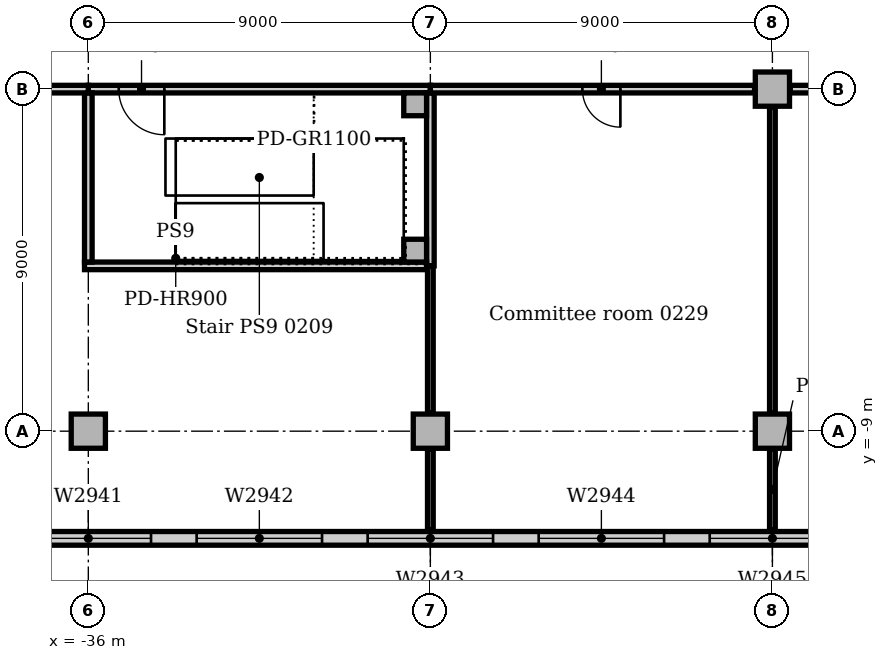
"""IFC4 building model, lengths in metres.
Left out: names, types, materials, properties, quantities, classifications, styles, units other than length and angle.
Written with IfcOpenShell. Run it as: python <this file> out.ifc"""

import sys

from ifc_helpers import new_model, si_unit, direction, frame, frame_2d, origin, origin_2d, place, context, subcontext, project, spatial, rectangle, extrude, element, fill, save


model = new_model("IFC4")
c1 = context("Model", 3, precision=1e-05, world=origin(), true_north=direction((0.0, 1.0)))
c2 = subcontext(c1, "Body", "Model", "MODEL_VIEW")
j1 = project(units=[si_unit("LENGTHUNIT", "METRE"), si_unit("PLANEANGLEUNIT", "RADIAN")], contexts=[c1])
p1 = place(None, origin())
s1 = spatial("IfcSite", under=j1, at=p1, CompositionType="ELEMENT")
p2 = place(p1, origin())
s2 = spatial("IfcBuilding", under=s1, at=p2, CompositionType="ELEMENT")
p3 = place(p2, frame((0.0, 0.0, 11.0)))
s3 = spatial("IfcBuildingStorey", under=s2, at=p3, CompositionType="ELEMENT", Elevation=11.0)
for number, where, z_axis, x_axis in (
    (1, (-36.0, -9.0, 0.0), (0.0, 0.0, 1.0), (1.0, 0.0, 0.0)),
    (2, (-27.0, -9.0, 0.0), (0.0, 0.0, 1.0), (1.0, 0.0, 0.0)),
    (3, (-18.0, -9.0, 0.0), (0.0, 0.0, 1.0), (1.0, 0.0, 0.0)),
    (4, (-18.0, 0.0, 0.0), (0.0, 0.0, 1.0), (1.0, 0.0, 0.0)),
):
    element("IfcColumn", number, at=place(p3, frame(where, z_axis=z_axis, x_axis=x_axis)), inside=s3, PredefinedType="COLUMN", context=c2, shape_type="SweptSolid", body=[
        extrude(rectangle(XDim=0.9, YDim=0.9, at=origin_2d()), origin(), (0.0, 0.0, 1.0), 4.7),
    ])
p4 = place(p3, frame((-81.0, -11.82, 0.0), z_axis=(0.0, 0.0, 1.0), x_axis=(1.0, 0.0, 0.0)))
e5 = element("IfcWall", 5, at=p4, inside=s3, PredefinedType="STANDARD", context=c2, shape_type="SweptSolid", body=[
    extrude(rectangle(XDim=144.0, YDim=0.36, at=frame_2d((72.0, 0.0))), origin(), (0.0, 0.0, 1.0), 4.7),
])
p5 = place(p4, frame((2.85, 0.0, 0.9)))
e6 = element("IfcOpeningElement", 6, at=p5, cuts=e5, PredefinedType="OPENING", context=c2, shape_type="SweptSolid", body=[
    extrude(rectangle(XDim=3.3, YDim=2.4, at=frame_2d((1.65, 1.2))), frame((0.0, 0.19, 0.0), z_axis=(0.0, -1.0, 0.0), x_axis=(1.0, 0.0, 0.0)), (0.0, 0.0, 1.0), 0.38),
])
p6 = place(p4, frame((7.35, 0.0, 0.9)))
e7 = element("IfcOpeningElement", 7, at=p6, cuts=e5, PredefinedType="OPENING", context=c2, shape_type="SweptSolid", body=[
    extrude(rectangle(XDim=3.3, YDim=2.4, at=frame_2d((1.65, 1.2))), frame((0.0, 0.19, 0.0), z_axis=(0.0, -1.0, 0.0), x_axis=(1.0, 0.0, 0.0)), (0.0, 0.0, 1.0), 0.38),
])
p7 = place(p4, frame((11.85, 0.0, 0.9)))
e8 = element("IfcOpeningElement", 8, at=p7, cuts=e5, PredefinedType="OPENING", context=c2, shape_type="SweptSolid", body=[
    extrude(rectangle(XDim=3.3, YDim=2.4, at=frame_2d((1.65, 1.2))), frame((0.0, 0.19, 0.0), z_axis=(0.0, -1.0, 0.0), x_axis=(1.0, 0.0, 0.0)), (0.0, 0.0, 1.0), 0.38),
])
p8 = place(p4, frame((16.35, 0.0, 0.9)))
e9 = element("IfcOpeningElement", 9, at=p8, cuts=e5, PredefinedType="OPENING", context=c2, shape_type="SweptSolid", body=[
    extrude(rectangle(XDim=3.3, YDim=2.4, at=frame_2d((1.65, 1.2))), frame((0.0, 0.19, 0.0), z_axis=(0.0, -1.0, 0.0), x_axis=(1.0, 0.0, 0.0)), (0.0, 0.0, 1.0), 0.38),
])
p9 = place(p4, frame((20.85, 0.0, 0.9)))
e10 = element("IfcOpeningElement", 10, at=p9, cuts=e5, PredefinedType="OPENING", context=c2, shape_type="SweptSolid", body=[
    extrude(rectangle(XDim=3.3, YDim=2.4, at=frame_2d((1.65, 1.2))), frame((0.0, 0.19, 0.0), z_axis=(0.0, -1.0, 0.0), x_axis=(1.0, 0.0, 0.0)), (0.0, 0.0, 1.0), 0.38),
])
p10 = place(p4, frame((25.35, 0.0, 0.9)))
e11 = element("IfcOpeningElement", 11, at=p10, cuts=e5, PredefinedType="OPENING", context=c2, shape_type="SweptSolid", body=[
    extrude(rectangle(XDim=3.3, YDim=2.4, at=frame_2d((1.65, 1.2))), frame((0.0, 0.19, 0.0), z_axis=(0.0, -1.0, 0.0), x_axis=(1.0, 0.0, 0.0)), (0.0, 0.0, 1.0), 0.38),
])
p11 = place(p4, frame((29.85, 0.0, 0.9)))
e12 = element("IfcOpeningElement", 12, at=p11, cuts=e5, PredefinedType="OPENING", context=c2, shape_type="SweptSolid", body=[
    extrude(rectangle(XDim=3.3, YDim=2.4, at=frame_2d((1.65, 1.2))), frame((0.0, 0.19, 0.0), z_axis=(0.0, -1.0, 0.0), x_axis=(1.0, 0.0, 0.0)), (0.0, 0.0, 1.0), 0.38),
])
p12 = place(p4, frame((34.35, 0.0, 0.9)))
e13 = element("IfcOpeningElement", 13, at=p12, cuts=e5, PredefinedType="OPENING", context=c2, shape_type="SweptSolid", body=[
    extrude(rectangle(XDim=3.3, YDim=2.4, at=frame_2d((1.65, 1.2))), frame((0.0, 0.19, 0.0), z_axis=(0.0, -1.0, 0.0), x_axis=(1.0, 0.0, 0.0)), (0.0, 0.0, 1.0), 0.38),
])
p13 = place(p4, frame((38.85, 0.0, 0.9)))
e14 = element("IfcOpeningElement", 14, at=p13, cuts=e5, PredefinedType="OPENING", context=c2, shape_type="SweptSolid", body=[
    extrude(rectangle(XDim=3.3, YDim=2.4, at=frame_2d((1.65, 1.2))), frame((0.0, 0.19, 0.0), z_axis=(0.0, -1.0, 0.0), x_axis=(1.0, 0.0, 0.0)), (0.0, 0.0, 1.0), 0.38),
])
p14 = place(p4, frame((43.35, 0.0, 0.9)))
e15 = element("IfcOpeningElement", 15, at=p14, cuts=e5, PredefinedType="OPENING", context=c2, shape_type="SweptSolid", body=[
    extrude(rectangle(XDim=3.3, YDim=2.4, at=frame_2d((1.65, 1.2))), frame((0.0, 0.19, 0.0), z_axis=(0.0, -1.0, 0.0), x_axis=(1.0, 0.0, 0.0)), (0.0, 0.0, 1.0), 0.38),
])
p15 = place(p4, frame((47.85, 0.0, 0.9)))
e16 = element("IfcOpeningElement", 16, at=p15, cuts=e5, PredefinedType="OPENING", context=c2, shape_type="SweptSolid", body=[
    extrude(rectangle(XDim=3.3, YDim=2.4, at=frame_2d((1.65, 1.2))), frame((0.0, 0.19, 0.0), z_axis=(0.0, -1.0, 0.0), x_axis=(1.0, 0.0, 0.0)), (0.0, 0.0, 1.0), 0.38),
])
p16 = place(p4, frame((52.35, 0.0, 0.9)))
e17 = element("IfcOpeningElement", 17, at=p16, cuts=e5, PredefinedType="OPENING", context=c2, shape_type="SweptSolid", body=[
    extrude(rectangle(XDim=3.3, YDim=2.4, at=frame_2d((1.65, 1.2))), frame((0.0, 0.19, 0.0), z_axis=(0.0, -1.0, 0.0), x_axis=(1.0, 0.0, 0.0)), (0.0, 0.0, 1.0), 0.38),
])
p17 = place(p4, frame((56.85, 0.0, 0.9)))
e18 = element("IfcOpeningElement", 18, at=p17, cuts=e5, PredefinedType="OPENING", context=c2, shape_type="SweptSolid", body=[
    extrude(rectangle(XDim=3.3, YDim=2.4, at=frame_2d((1.65, 1.2))), frame((0.0, 0.19, 0.0), z_axis=(0.0, -1.0, 0.0), x_axis=(1.0, 0.0, 0.0)), (0.0, 0.0, 1.0), 0.38),
])
p18 = place(p4, frame((61.35, 0.0, 0.9)))
e19 = element("IfcOpeningElement", 19, at=p18, cuts=e5, PredefinedType="OPENING", context=c2, shape_type="SweptSolid", body=[
    extrude(rectangle(XDim=3.3, YDim=2.4, at=frame_2d((1.65, 1.2))), frame((0.0, 0.19, 0.0), z_axis=(0.0, -1.0, 0.0), x_axis=(1.0, 0.0, 0.0)), (0.0, 0.0, 1.0), 0.38),
])
p19 = place(p4, frame((65.85, 0.0, 0.9)))
e20 = element("IfcOpeningElement", 20, at=p19, cuts=e5, PredefinedType="OPENING", context=c2, shape_type="SweptSolid", body=[
    extrude(rectangle(XDim=3.3, YDim=2.4, at=frame_2d((1.65, 1.2))), frame((0.0, 0.19, 0.0), z_axis=(0.0, -1.0, 0.0), x_axis=(1.0, 0.0, 0.0)), (0.0, 0.0, 1.0), 0.38),
])
p20 = place(p4, frame((70.35, 0.0, 0.9)))
e21 = element("IfcOpeningElement", 21, at=p20, cuts=e5, PredefinedType="OPENING", context=c2, shape_type="SweptSolid", body=[
    extrude(rectangle(XDim=3.3, YDim=2.4, at=frame_2d((1.65, 1.2))), frame((0.0, 0.19, 0.0), z_axis=(0.0, -1.0, 0.0), x_axis=(1.0, 0.0, 0.0)), (0.0, 0.0, 1.0), 0.38),
])
p21 = place(p4, frame((74.85, 0.0, 0.9)))
e22 = element("IfcOpeningElement", 22, at=p21, cuts=e5, PredefinedType="OPENING", context=c2, shape_type="SweptSolid", body=[
    extrude(rectangle(XDim=3.3, YDim=2.4, at=frame_2d((1.65, 1.2))), frame((0.0, 0.19, 0.0), z_axis=(0.0, -1.0, 0.0), x_axis=(1.0, 0.0, 0.0)), (0.0, 0.0, 1.0), 0.38),
])
p22 = place(p4, frame((79.35, 0.0, 0.9)))
e23 = element("IfcOpeningElement", 23, at=p22, cuts=e5, PredefinedType="OPENING", context=c2, shape_type="SweptSolid", body=[
    extrude(rectangle(XDim=3.3, YDim=2.4, at=frame_2d((1.65, 1.2))), frame((0.0, 0.19, 0.0), z_axis=(0.0, -1.0, 0.0), x_axis=(1.0, 0.0, 0.0)), (0.0, 0.0, 1.0), 0.38),
])
p23 = place(p4, frame((83.85, 0.0, 0.9)))
e24 = element("IfcOpeningElement", 24, at=p23, cuts=e5, PredefinedType="OPENING", context=c2, shape_type="SweptSolid", body=[
    extrude(rectangle(XDim=3.3, YDim=2.4, at=frame_2d((1.65, 1.2))), frame((0.0, 0.19, 0.0), z_axis=(0.0, -1.0, 0.0), x_axis=(1.0, 0.0, 0.0)), (0.0, 0.0, 1.0), 0.38),
])
p24 = place(p4, frame((88.35, 0.0, 0.9)))
e25 = element("IfcOpeningElement", 25, at=p24, cuts=e5, PredefinedType="OPENING", context=c2, shape_type="SweptSolid", body=[
    extrude(rectangle(XDim=3.3, YDim=2.4, at=frame_2d((1.65, 1.2))), frame((0.0, 0.19, 0.0), z_axis=(0.0, -1.0, 0.0), x_axis=(1.0, 0.0, 0.0)), (0.0, 0.0, 1.0), 0.38),
])
p25 = place(p4, frame((92.85, 0.0, 0.9)))
e26 = element("IfcOpeningElement", 26, at=p25, cuts=e5, PredefinedType="OPENING", context=c2, shape_type="SweptSolid", body=[
    extrude(rectangle(XDim=3.3, YDim=2.4, at=frame_2d((1.65, 1.2))), frame((0.0, 0.19, 0.0), z_axis=(0.0, -1.0, 0.0), x_axis=(1.0, 0.0, 0.0)), (0.0, 0.0, 1.0), 0.38),
])
p26 = place(p4, frame((97.35, 0.0, 0.9)))
e27 = element("IfcOpeningElement", 27, at=p26, cuts=e5, PredefinedType="OPENING", context=c2, shape_type="SweptSolid", body=[
    extrude(rectangle(XDim=3.3, YDim=2.4, at=frame_2d((1.65, 1.2))), frame((0.0, 0.19, 0.0), z_axis=(0.0, -1.0, 0.0), x_axis=(1.0, 0.0, 0.0)), (0.0, 0.0, 1.0), 0.38),
])
p27 = place(p4, frame((101.85, 0.0, 0.9)))
e28 = element("IfcOpeningElement", 28, at=p27, cuts=e5, PredefinedType="OPENING", context=c2, shape_type="SweptSolid", body=[
    extrude(rectangle(XDim=3.3, YDim=2.4, at=frame_2d((1.65, 1.2))), frame((0.0, 0.19, 0.0), z_axis=(0.0, -1.0, 0.0), x_axis=(1.0, 0.0, 0.0)), (0.0, 0.0, 1.0), 0.38),
])
p28 = place(p4, frame((106.35, 0.0, 0.9)))
e29 = element("IfcOpeningElement", 29, at=p28, cuts=e5, PredefinedType="OPENING", context=c2, shape_type="SweptSolid", body=[
    extrude(rectangle(XDim=3.3, YDim=2.4, at=frame_2d((1.65, 1.2))), frame((0.0, 0.19, 0.0), z_axis=(0.0, -1.0, 0.0), x_axis=(1.0, 0.0, 0.0)), (0.0, 0.0, 1.0), 0.38),
])
p29 = place(p4, frame((110.85, 0.0, 0.9)))
e30 = element("IfcOpeningElement", 30, at=p29, cuts=e5, PredefinedType="OPENING", context=c2, shape_type="SweptSolid", body=[
    extrude(rectangle(XDim=3.3, YDim=2.4, at=frame_2d((1.65, 1.2))), frame((0.0, 0.19, 0.0), z_axis=(0.0, -1.0, 0.0), x_axis=(1.0, 0.0, 0.0)), (0.0, 0.0, 1.0), 0.38),
])
p30 = place(p4, frame((115.35, 0.0, 0.9)))
e31 = element("IfcOpeningElement", 31, at=p30, cuts=e5, PredefinedType="OPENING", context=c2, shape_type="SweptSolid", body=[
    extrude(rectangle(XDim=3.3, YDim=2.4, at=frame_2d((1.65, 1.2))), frame((0.0, 0.19, 0.0), z_axis=(0.0, -1.0, 0.0), x_axis=(1.0, 0.0, 0.0)), (0.0, 0.0, 1.0), 0.38),
])
p31 = place(p4, frame((119.85, 0.0, 0.9)))
e32 = element("IfcOpeningElement", 32, at=p31, cuts=e5, PredefinedType="OPENING", context=c2, shape_type="SweptSolid", body=[
    extrude(rectangle(XDim=3.3, YDim=2.4, at=frame_2d((1.65, 1.2))), frame((0.0, 0.19, 0.0), z_axis=(0.0, -1.0, 0.0), x_axis=(1.0, 0.0, 0.0)), (0.0, 0.0, 1.0), 0.38),
])
p32 = place(p4, frame((124.35, 0.0, 0.9)))
e33 = element("IfcOpeningElement", 33, at=p32, cuts=e5, PredefinedType="OPENING", context=c2, shape_type="SweptSolid", body=[
    extrude(rectangle(XDim=3.3, YDim=2.4, at=frame_2d((1.65, 1.2))), frame((0.0, 0.19, 0.0), z_axis=(0.0, -1.0, 0.0), x_axis=(1.0, 0.0, 0.0)), (0.0, 0.0, 1.0), 0.38),
])
p33 = place(p4, frame((128.85, 0.0, 0.9)))
e34 = element("IfcOpeningElement", 34, at=p33, cuts=e5, PredefinedType="OPENING", context=c2, shape_type="SweptSolid", body=[
    extrude(rectangle(XDim=3.3, YDim=2.4, at=frame_2d((1.65, 1.2))), frame((0.0, 0.19, 0.0), z_axis=(0.0, -1.0, 0.0), x_axis=(1.0, 0.0, 0.0)), (0.0, 0.0, 1.0), 0.38),
])
p34 = place(p4, frame((133.35, 0.0, 0.9)))
e35 = element("IfcOpeningElement", 35, at=p34, cuts=e5, PredefinedType="OPENING", context=c2, shape_type="SweptSolid", body=[
    extrude(rectangle(XDim=3.3, YDim=2.4, at=frame_2d((1.65, 1.2))), frame((0.0, 0.19, 0.0), z_axis=(0.0, -1.0, 0.0), x_axis=(1.0, 0.0, 0.0)), (0.0, 0.0, 1.0), 0.38),
])
p35 = place(p4, frame((137.85, 0.0, 0.9)))
e36 = element("IfcOpeningElement", 36, at=p35, cuts=e5, PredefinedType="OPENING", context=c2, shape_type="SweptSolid", body=[
    extrude(rectangle(XDim=3.3, YDim=2.4, at=frame_2d((1.65, 1.2))), frame((0.0, 0.19, 0.0), z_axis=(0.0, -1.0, 0.0), x_axis=(1.0, 0.0, 0.0)), (0.0, 0.0, 1.0), 0.38),
])
for number, where, z_axis, x_axis in (
    (37, (-27.4, -4.25, 0.0), (0.0, 0.0, 1.0), (1.0, 0.0, 0.0)),
    (38, (-27.4, -0.4, 0.0), (0.0, 0.0, 1.0), (1.0, 0.0, 0.0)),
):
    element("IfcColumn", number, at=place(p3, frame(where, z_axis=z_axis, x_axis=x_axis)), inside=s3, PredefinedType="COLUMN", context=c2, shape_type="SweptSolid", body=[
        extrude(rectangle(XDim=0.6, YDim=0.6, at=origin_2d()), origin(), (0.0, 0.0, 1.0), 5.0),
    ])
p36 = place(p3, frame((-36.0, 0.0, 0.0), z_axis=(0.0, 0.0, 1.0), x_axis=(1.0, 0.0, 0.0)))
e39 = element("IfcWall", 39, at=p36, inside=s3, PredefinedType="SOLIDWALL", context=c2, shape_type="SweptSolid", body=[
    extrude(rectangle(XDim=9.0, YDim=0.2, at=frame_2d((4.5, 0.0))), origin(), (0.0, 0.0, 1.0), 4.7),
])
p37 = place(p36, frame((0.8, 0.0, 0.0)))
e40 = element("IfcOpeningElement", 40, at=p37, cuts=e39, PredefinedType="OPENING", context=c2, shape_type="SweptSolid", body=[
    extrude(rectangle(XDim=1.2, YDim=2.1, at=frame_2d((0.6, 1.05))), frame((0.0, 0.11, 0.0), z_axis=(0.0, -1.0, 0.0), x_axis=(1.0, 0.0, 0.0)), (0.0, 0.0, 1.0), 0.22),
])
p38 = place(p3, frame((-27.0, -4.65, 0.0), z_axis=(0.0, 0.0, 1.0), x_axis=(0.0, 1.0, 0.0)))
e41 = element("IfcWall", 41, at=p38, inside=s3, PredefinedType="SOLIDWALL", context=c2, shape_type="SweptSolid", body=[
    extrude(rectangle(XDim=4.55, YDim=0.2, at=frame_2d((2.275, 0.0))), origin(), (0.0, 0.0, 1.0), 4.7),
])
p39 = place(p3, frame((-36.1, -4.65, 0.0), z_axis=(0.0, 0.0, 1.0), x_axis=(1.0, 0.0, 0.0)))
e42 = element("IfcWall", 42, at=p39, inside=s3, PredefinedType="SOLIDWALL", context=c2, shape_type="SweptSolid", body=[
    extrude(rectangle(XDim=9.0, YDim=0.2, at=frame_2d((4.5, 0.0))), origin(), (0.0, 0.0, 1.0), 4.7),
])
p40 = place(p3, frame((-36.0, -4.55, 0.0), z_axis=(0.0, 0.0, 1.0), x_axis=(0.0, 1.0, 0.0)))
e43 = element("IfcWall", 43, at=p40, inside=s3, PredefinedType="SOLIDWALL", context=c2, shape_type="SweptSolid", body=[
    extrude(rectangle(XDim=4.45, YDim=0.2, at=frame_2d((2.225, 0.0))), origin(), (0.0, 0.0, 1.0), 4.7),
])
p41 = place(p3, frame((-45.0, 0.0, 0.0), z_axis=(0.0, 0.0, 1.0), x_axis=(1.0, 0.0, 0.0)))
e44 = element("IfcWall", 44, at=p41, inside=s3, PredefinedType="PARTITIONING", context=c2, shape_type="SweptSolid", body=[
    extrude(rectangle(XDim=9.0, YDim=0.2, at=frame_2d((4.5, 0.0))), origin(), (0.0, 0.0, 1.0), 4.7),
])
p42 = place(p41, frame((4.0, 0.0, 0.0)))
e45 = element("IfcOpeningElement", 45, at=p42, cuts=e44, PredefinedType="OPENING", context=c2, shape_type="SweptSolid", body=[
    extrude(rectangle(XDim=1.0, YDim=2.1, at=frame_2d((0.5, 1.05))), frame((0.0, 0.11, 0.0), z_axis=(0.0, -1.0, 0.0), x_axis=(1.0, 0.0, 0.0)), (0.0, 0.0, 1.0), 0.22),
])
p43 = place(p3, frame((-27.0, 0.0, 0.0), z_axis=(0.0, 0.0, 1.0), x_axis=(1.0, 0.0, 0.0)))
e46 = element("IfcWall", 46, at=p43, inside=s3, PredefinedType="PARTITIONING", context=c2, shape_type="SweptSolid", body=[
    extrude(rectangle(XDim=8.53, YDim=0.2, at=frame_2d((4.265, 0.0))), origin(), (0.0, 0.0, 1.0), 4.7),
])
p44 = place(p43, frame((4.0, 0.0, 0.0)))
e47 = element("IfcOpeningElement", 47, at=p44, cuts=e46, PredefinedType="OPENING", context=c2, shape_type="SweptSolid", body=[
    extrude(rectangle(XDim=1.0, YDim=2.1, at=frame_2d((0.5, 1.05))), frame((0.0, 0.11, 0.0), z_axis=(0.0, -1.0, 0.0), x_axis=(1.0, 0.0, 0.0)), (0.0, 0.0, 1.0), 0.22),
])
p45 = place(p3, frame((-17.53, 0.0, 0.0), z_axis=(0.0, 0.0, 1.0), x_axis=(1.0, 0.0, 0.0)))
e48 = element("IfcWall", 48, at=p45, inside=s3, PredefinedType="PARTITIONING", context=c2, shape_type="SweptSolid", body=[
    extrude(rectangle(XDim=8.06, YDim=0.2, at=frame_2d((4.03, 0.0))), origin(), (0.0, 0.0, 1.0), 4.7),
])
p46 = place(p45, frame((3.53, 0.0, 0.0)))
e49 = element("IfcOpeningElement", 49, at=p46, cuts=e48, PredefinedType="OPENING", context=c2, shape_type="SweptSolid", body=[
    extrude(rectangle(XDim=1.0, YDim=2.1, at=frame_2d((0.5, 1.05))), frame((0.0, 0.11, 0.0), z_axis=(0.0, -1.0, 0.0), x_axis=(1.0, 0.0, 0.0)), (0.0, 0.0, 1.0), 0.22),
])
p47 = place(p3, frame((-18.0, -11.6, 0.0), z_axis=(0.0, 0.0, 1.0), x_axis=(0.0, 1.0, 0.0)))
e50 = element("IfcWall", 50, at=p47, inside=s3, PredefinedType="PARTITIONING", context=c2, shape_type="SweptSolid", body=[
    extrude(rectangle(XDim=2.13, YDim=0.15, at=frame_2d((1.065, 0.0))), origin(), (0.0, 0.0, 1.0), 4.7),
])
p48 = place(p3, frame((-18.0, -8.53, 0.0), z_axis=(0.0, 0.0, 1.0), x_axis=(0.0, 1.0, 0.0)))
e51 = element("IfcWall", 51, at=p48, inside=s3, PredefinedType="PARTITIONING", context=c2, shape_type="SweptSolid", body=[
    extrude(rectangle(XDim=8.06, YDim=0.15, at=frame_2d((4.03, 0.0))), origin(), (0.0, 0.0, 1.0), 4.7),
])
p49 = place(p3, frame((-27.0, -11.6, 0.0), z_axis=(0.0, 0.0, 1.0), x_axis=(0.0, 1.0, 0.0)))
e52 = element("IfcWall", 52, at=p49, inside=s3, PredefinedType="PARTITIONING", context=c2, shape_type="SweptSolid", body=[
    extrude(rectangle(XDim=2.13, YDim=0.15, at=frame_2d((1.065, 0.0))), origin(), (0.0, 0.0, 1.0), 4.7),
])
p50 = place(p3, frame((-27.0, -8.53, 0.0), z_axis=(0.0, 0.0, 1.0), x_axis=(0.0, 1.0, 0.0)))
e53 = element("IfcWall", 53, at=p50, inside=s3, PredefinedType="PARTITIONING", context=c2, shape_type="SweptSolid", body=[
    extrude(rectangle(XDim=3.88, YDim=0.15, at=frame_2d((1.94, 0.0))), origin(), (0.0, 0.0, 1.0), 4.7),
])
p51 = place(p14, origin())
e54 = element("IfcWindow", 54, at=p51, inside=s3, PartitioningType="SINGLE_PANEL", PredefinedType="WINDOW", context=c2, shape_type="SweptSolid", body=[
    extrude(rectangle(XDim=3.3, YDim=2.4, at=frame_2d((1.65, 1.2))), frame((0.0, 0.13, 0.0), z_axis=(0.0, -1.0, 0.0), x_axis=(1.0, 0.0, 0.0)), (0.0, 0.0, 1.0), 0.06),
])
fill(e15, e54)
p52 = place(p15, origin())
e55 = element("IfcWindow", 55, at=p52, inside=s3, PartitioningType="SINGLE_PANEL", PredefinedType="WINDOW", context=c2, shape_type="SweptSolid", body=[
    extrude(rectangle(XDim=3.3, YDim=2.4, at=frame_2d((1.65, 1.2))), frame((0.0, 0.13, 0.0), z_axis=(0.0, -1.0, 0.0), x_axis=(1.0, 0.0, 0.0)), (0.0, 0.0, 1.0), 0.06),
])
fill(e16, e55)
p53 = place(p16, origin())
e56 = element("IfcWindow", 56, at=p53, inside=s3, PartitioningType="SINGLE_PANEL", PredefinedType="WINDOW", context=c2, shape_type="SweptSolid", body=[
    extrude(rectangle(XDim=3.3, YDim=2.4, at=frame_2d((1.65, 1.2))), frame((0.0, 0.13, 0.0), z_axis=(0.0, -1.0, 0.0), x_axis=(1.0, 0.0, 0.0)), (0.0, 0.0, 1.0), 0.06),
])
fill(e17, e56)
p54 = place(p17, origin())
e57 = element("IfcWindow", 57, at=p54, inside=s3, PartitioningType="SINGLE_PANEL", PredefinedType="WINDOW", context=c2, shape_type="SweptSolid", body=[
    extrude(rectangle(XDim=3.3, YDim=2.4, at=frame_2d((1.65, 1.2))), frame((0.0, 0.13, 0.0), z_axis=(0.0, -1.0, 0.0), x_axis=(1.0, 0.0, 0.0)), (0.0, 0.0, 1.0), 0.06),
])
fill(e18, e57)
p55 = place(p18, origin())
e58 = element("IfcWindow", 58, at=p55, inside=s3, PartitioningType="SINGLE_PANEL", PredefinedType="WINDOW", context=c2, shape_type="SweptSolid", body=[
    extrude(rectangle(XDim=3.3, YDim=2.4, at=frame_2d((1.65, 1.2))), frame((0.0, 0.13, 0.0), z_axis=(0.0, -1.0, 0.0), x_axis=(1.0, 0.0, 0.0)), (0.0, 0.0, 1.0), 0.06),
])
fill(e19, e58)
p56 = place(p44, frame((1.0, 0.0, 0.0), z_axis=(0.0, 0.0, 1.0), x_axis=(-1.0, 0.0, 0.0)))
e59 = element("IfcDoor", 59, at=p56, inside=s3, OperationType="SINGLE_SWING_LEFT", PredefinedType="DOOR", context=c2, shape_type="SweptSolid", body=[
    extrude(rectangle(XDim=1.0, YDim=2.1, at=frame_2d((0.5, 1.05))), frame((0.0, 0.025, 0.0), z_axis=(0.0, -1.0, 0.0), x_axis=(1.0, 0.0, 0.0)), (0.0, 0.0, 1.0), 0.05),
])
fill(e47, e59)
p57 = place(p37, frame((1.2, 0.0, 0.0), z_axis=(0.0, 0.0, 1.0), x_axis=(-1.0, 0.0, 0.0)))
e60 = element("IfcDoor", 60, at=p57, inside=s3, OperationType="SINGLE_SWING_LEFT", PredefinedType="DOOR", context=c2, shape_type="SweptSolid", body=[
    extrude(rectangle(XDim=1.2, YDim=2.1, at=frame_2d((0.6, 1.05))), frame((0.0, 0.025, 0.0), z_axis=(0.0, -1.0, 0.0), x_axis=(1.0, 0.0, 0.0)), (0.0, 0.0, 1.0), 0.05),
])
fill(e40, e60)
save(model, sys.argv[1])
